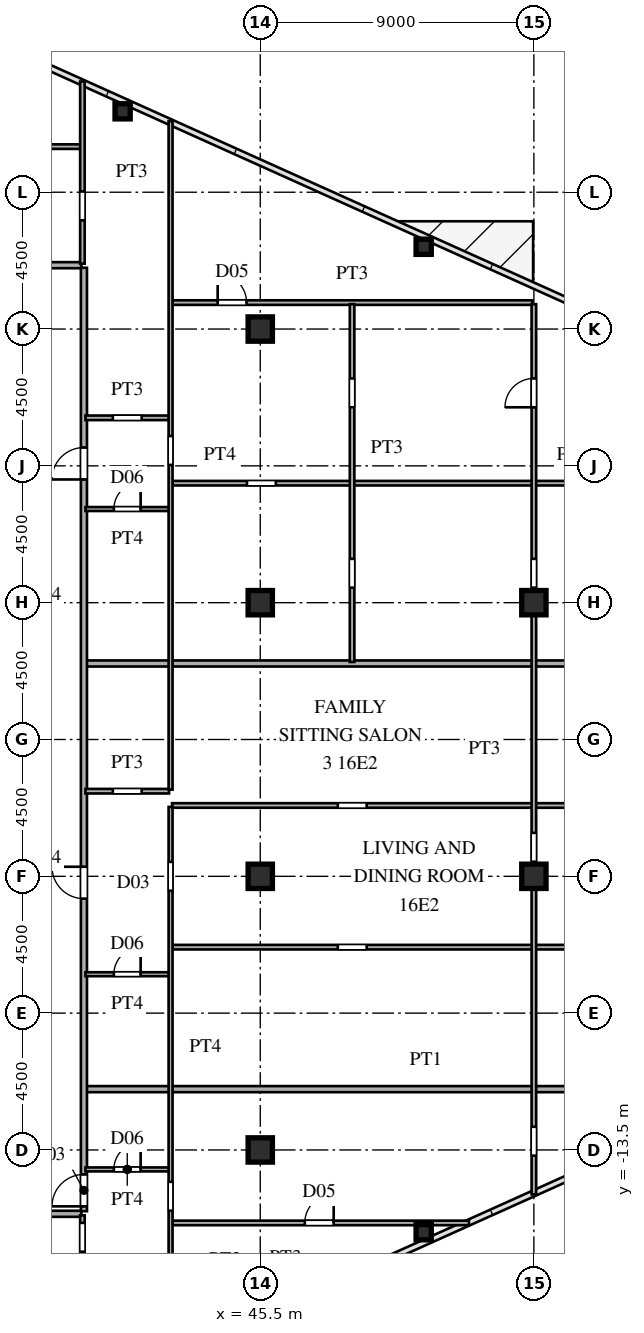
"""IFC4 building model, lengths in metres.
Left out: names, types, materials, properties, quantities, classifications, styles, units other than length and angle.
Written with IfcOpenShell. Run it as: python <this file> out.ifc"""

import sys

from ifc_helpers import new_model, si_unit, direction, frame, frame_2d, origin, origin_2d, place, context, subcontext, project, spatial, rectangle, hollow_rectangle, i_section, extrude, source, transform, mapped, element, fill, save


model = new_model("IFC4")
c1 = context("Model", 3, precision=1e-05, world=origin(), true_north=direction((0.0, 1.0)))
c2 = subcontext(c1, "Body", "Model", "MODEL_VIEW")
j1 = project(units=[si_unit("LENGTHUNIT", "METRE"), si_unit("PLANEANGLEUNIT", "RADIAN")], contexts=[c1])
p1 = place(None, origin())
s1 = spatial("IfcSite", under=j1, at=p1, CompositionType="ELEMENT")
p2 = place(p1, origin())
s2 = spatial("IfcBuilding", under=s1, at=p2, CompositionType="ELEMENT")
p3 = place(p2, frame((0.0, 0.0, 62.1)))
s3 = spatial("IfcBuildingStorey", under=s2, at=p3, CompositionType="ELEMENT", Elevation=62.1)
m1 = source(origin(), c2, "Body", "SweptSolid", [
    extrude(i_section(OverallWidth=0.8, OverallDepth=0.8, WebThickness=0.032, FlangeThickness=0.05, at=origin_2d()), origin(), (0.0, 0.0, 1.0), 3.6),
])
for number, where, z_axis, x_axis in (
    (1, (45.5, -13.5, 0.0), (0.0, 0.0, 1.0), (1.0, 0.0, 0.0)),
    (2, (45.5, -4.5, 0.0), (0.0, 0.0, 1.0), (1.0, 0.0, 0.0)),
    (3, (45.5, 4.5, 0.0), (0.0, 0.0, 1.0), (1.0, 0.0, 0.0)),
    (4, (45.5, 13.5, 0.0), (0.0, 0.0, 1.0), (1.0, 0.0, 0.0)),
    (5, (54.5, -4.5, 0.0), (0.0, 0.0, 1.0), (1.0, 0.0, 0.0)),
    (6, (54.5, 4.5, 0.0), (0.0, 0.0, 1.0), (1.0, 0.0, 0.0)),
):
    element("IfcColumn", number, at=place(p3, frame(where, z_axis=z_axis, x_axis=x_axis)), inside=s3, PredefinedType="COLUMN", context=c2, shape_type="MappedRepresentation", body=[
        mapped(m1, transform((0.0, 0.0, 0.0), scale=1.0)),
    ])
m2 = source(origin(), c2, "Body", "SweptSolid", [
    extrude(hollow_rectangle(XDim=0.5, YDim=0.5, WallThickness=0.02, at=origin_2d()), origin(), (0.0, 0.0, 1.0), 3.6),
])
for number, where, z_axis, x_axis in (
    (7, (50.875, -16.205, 0.0), (0.0, 0.0, 1.0), (1.0, 0.0, 0.0)),
    (8, (40.973, 20.661, 0.0), (0.0, 0.0, 1.0), (1.0, 0.0, 0.0)),
    (9, (50.875, 16.205, 0.0), (0.0, 0.0, 1.0), (1.0, 0.0, 0.0)),
):
    element("IfcColumn", number, at=place(p3, frame(where, z_axis=z_axis, x_axis=x_axis)), inside=s3, PredefinedType="COLUMN", context=c2, shape_type="MappedRepresentation", body=[
        mapped(m2, transform((0.0, 0.0, 0.0), scale=1.0)),
    ])
p4 = place(p3, frame((42.6, -15.9, 0.0), z_axis=(0.0, 0.0, 1.0), x_axis=(1.0, 0.0, 0.0)))
e10 = element("IfcWall", 10, at=p4, inside=s3, PredefinedType="PARTITIONING", context=c2, shape_type="SweptSolid", body=[
    extrude(rectangle(XDim=9.765, YDim=0.15, at=frame_2d((4.882, 0.0))), origin(), (0.0, 0.0, 1.0), 3.38),
])
p5 = place(p4, frame((4.365, 0.0, 0.0)))
e11 = element("IfcOpeningElement", 11, at=p5, cuts=e10, PredefinedType="OPENING", context=c2, shape_type="SweptSolid", body=[
    extrude(rectangle(XDim=0.95, YDim=2.15, at=frame_2d((0.475, 1.075))), frame((0.0, 0.085, 0.0), z_axis=(0.0, -1.0, 0.0), x_axis=(1.0, 0.0, 0.0)), (0.0, 0.0, 1.0), 0.17),
])
p6 = place(p3, frame((36.585, -15.6, 0.0), z_axis=(0.0, 0.0, 1.0), x_axis=(1.0, 0.0, 0.0)))
e12 = element("IfcWall", 12, at=p6, inside=s3, PredefinedType="PARTITIONING", context=c2, shape_type="SweptSolid", body=[
    extrude(rectangle(XDim=3.03, YDim=0.2, at=frame_2d((1.515, 0.0))), origin(), (0.0, 0.0, 1.0), 3.38),
])
p7 = place(p3, frame((39.75, -14.14, 0.0), z_axis=(0.0, 0.0, 1.0), x_axis=(1.0, 0.0, 0.0)))
e13 = element("IfcWall", 13, at=p7, inside=s3, PredefinedType="PARTITIONING", context=c2, shape_type="SweptSolid", body=[
    extrude(rectangle(XDim=2.75, YDim=0.13, at=frame_2d((1.375, 0.0))), origin(), (0.0, 0.0, 1.0), 3.38),
])
p8 = place(p7, frame((0.935, 0.0, 0.0)))
e14 = element("IfcOpeningElement", 14, at=p8, cuts=e13, PredefinedType="OPENING", context=c2, shape_type="SweptSolid", body=[
    extrude(rectangle(XDim=0.88, YDim=2.1, at=frame_2d((0.44, 1.05))), frame((0.0, 0.075, 0.0), z_axis=(0.0, -1.0, 0.0), x_axis=(1.0, 0.0, 0.0)), (0.0, 0.0, 1.0), 0.15),
])
p9 = place(p3, frame((39.78, -11.5, 0.0), z_axis=(0.0, 0.0, 1.0), x_axis=(1.0, 0.0, 0.0)))
e15 = element("IfcWall", 15, at=p9, inside=s3, PredefinedType="PARTITIONING", context=c2, shape_type="SweptSolid", body=[
    extrude(rectangle(XDim=22.343, YDim=0.2, at=frame_2d((11.171, 0.0))), origin(), (0.0, 0.0, 1.0), 3.38),
])
p10 = place(p3, frame((39.75, -7.72, 0.0), z_axis=(0.0, 0.0, 1.0), x_axis=(1.0, 0.0, 0.0)))
e16 = element("IfcWall", 16, at=p10, inside=s3, PredefinedType="PARTITIONING", context=c2, shape_type="SweptSolid", body=[
    extrude(rectangle(XDim=2.75, YDim=0.13, at=frame_2d((1.375, 0.0))), origin(), (0.0, 0.0, 1.0), 3.38),
])
p11 = place(p10, frame((0.935, 0.0, 0.0)))
e17 = element("IfcOpeningElement", 17, at=p11, cuts=e16, PredefinedType="OPENING", context=c2, shape_type="SweptSolid", body=[
    extrude(rectangle(XDim=0.88, YDim=2.1, at=frame_2d((0.44, 1.05))), frame((0.0, 0.075, 0.0), z_axis=(0.0, -1.0, 0.0), x_axis=(1.0, 0.0, 0.0)), (0.0, 0.0, 1.0), 0.15),
])
p12 = place(p3, frame((42.6, -6.83, 0.0), z_axis=(0.0, 0.0, 1.0), x_axis=(1.0, 0.0, 0.0)))
e18 = element("IfcWall", 18, at=p12, inside=s3, PredefinedType="PARTITIONING", context=c2, shape_type="SweptSolid", body=[
    extrude(rectangle(XDim=28.275, YDim=0.15, at=frame_2d((14.137, 0.0))), origin(), (0.0, 0.0, 1.0), 3.38),
])
p13 = place(p12, frame((5.45, 0.0, 0.0)))
e19 = element("IfcOpeningElement", 19, at=p13, cuts=e18, PredefinedType="OPENING", context=c2, shape_type="SweptSolid", body=[
    extrude(rectangle(XDim=0.95, YDim=2.15, at=frame_2d((0.475, 1.075))), frame((0.0, 0.085, 0.0), z_axis=(0.0, -1.0, 0.0), x_axis=(1.0, 0.0, 0.0)), (0.0, 0.0, 1.0), 0.17),
])
p14 = place(p12, frame((14.275, 0.0, 0.0)))
e20 = element("IfcOpeningElement", 20, at=p14, cuts=e18, PredefinedType="OPENING", context=c2, shape_type="SweptSolid", body=[
    extrude(rectangle(XDim=0.95, YDim=2.15, at=frame_2d((0.475, 1.075))), frame((0.0, 0.085, 0.0), z_axis=(0.0, -1.0, 0.0), x_axis=(1.0, 0.0, 0.0)), (0.0, 0.0, 1.0), 0.17),
])
p15 = place(p3, frame((42.6, -2.17, 0.0), z_axis=(0.0, 0.0, 1.0), x_axis=(1.0, 0.0, 0.0)))
e21 = element("IfcWall", 21, at=p15, inside=s3, PredefinedType="PARTITIONING", context=c2, shape_type="SweptSolid", body=[
    extrude(rectangle(XDim=28.435, YDim=0.15, at=frame_2d((14.217, 0.0))), origin(), (0.0, 0.0, 1.0), 3.38),
])
p16 = place(p15, frame((5.45, 0.0, 0.0)))
e22 = element("IfcOpeningElement", 22, at=p16, cuts=e21, PredefinedType="OPENING", context=c2, shape_type="SweptSolid", body=[
    extrude(rectangle(XDim=0.95, YDim=2.15, at=frame_2d((0.475, 1.075))), frame((0.0, 0.085, 0.0), z_axis=(0.0, -1.0, 0.0), x_axis=(1.0, 0.0, 0.0)), (0.0, 0.0, 1.0), 0.17),
])
p17 = place(p15, frame((14.275, 0.0, 0.0)))
e23 = element("IfcOpeningElement", 23, at=p17, cuts=e21, PredefinedType="OPENING", context=c2, shape_type="SweptSolid", body=[
    extrude(rectangle(XDim=0.95, YDim=2.15, at=frame_2d((0.475, 1.075))), frame((0.0, 0.085, 0.0), z_axis=(0.0, -1.0, 0.0), x_axis=(1.0, 0.0, 0.0)), (0.0, 0.0, 1.0), 0.17),
])
p18 = place(p3, frame((39.75, -1.7, 0.0), z_axis=(0.0, 0.0, 1.0), x_axis=(1.0, 0.0, 0.0)))
e24 = element("IfcWall", 24, at=p18, inside=s3, PredefinedType="PARTITIONING", context=c2, shape_type="SweptSolid", body=[
    extrude(rectangle(XDim=2.75, YDim=0.15, at=frame_2d((1.375, 0.0))), origin(), (0.0, 0.0, 1.0), 3.38),
])
p19 = place(p18, frame((0.9, 0.0, 0.0)))
e25 = element("IfcOpeningElement", 25, at=p19, cuts=e24, PredefinedType="OPENING", context=c2, shape_type="SweptSolid", body=[
    extrude(rectangle(XDim=0.95, YDim=2.15, at=frame_2d((0.475, 1.075))), frame((0.0, 0.085, 0.0), z_axis=(0.0, -1.0, 0.0), x_axis=(1.0, 0.0, 0.0)), (0.0, 0.0, 1.0), 0.17),
])
p20 = place(p3, frame((39.78, 2.5, 0.0), z_axis=(0.0, 0.0, 1.0), x_axis=(1.0, 0.0, 0.0)))
e26 = element("IfcWall", 26, at=p20, inside=s3, PredefinedType="PARTITIONING", context=c2, shape_type="SweptSolid", body=[
    extrude(rectangle(XDim=31.225, YDim=0.2, at=frame_2d((15.612, 0.0))), origin(), (0.0, 0.0, 1.0), 3.38),
])
p21 = place(p3, frame((39.75, 7.58, 0.0), z_axis=(0.0, 0.0, 1.0), x_axis=(1.0, 0.0, 0.0)))
e27 = element("IfcWall", 27, at=p21, inside=s3, PredefinedType="PARTITIONING", context=c2, shape_type="SweptSolid", body=[
    extrude(rectangle(XDim=2.75, YDim=0.13, at=frame_2d((1.375, 0.0))), origin(), (0.0, 0.0, 1.0), 3.38),
])
p22 = place(p21, frame((0.935, 0.0, 0.0)))
e28 = element("IfcOpeningElement", 28, at=p22, cuts=e27, PredefinedType="OPENING", context=c2, shape_type="SweptSolid", body=[
    extrude(rectangle(XDim=0.88, YDim=2.1, at=frame_2d((0.44, 1.05))), frame((0.0, 0.075, 0.0), z_axis=(0.0, -1.0, 0.0), x_axis=(1.0, 0.0, 0.0)), (0.0, 0.0, 1.0), 0.15),
])
p23 = place(p3, frame((42.6, 8.43, 0.0), z_axis=(0.0, 0.0, 1.0), x_axis=(1.0, 0.0, 0.0)))
e29 = element("IfcWall", 29, at=p23, inside=s3, PredefinedType="PARTITIONING", context=c2, shape_type="SweptSolid", body=[
    extrude(rectangle(XDim=26.359, YDim=0.15, at=frame_2d((13.179, 0.0))), origin(), (0.0, 0.0, 1.0), 3.38),
])
p24 = place(p23, frame((2.462, 0.0, 0.0)))
e30 = element("IfcOpeningElement", 30, at=p24, cuts=e29, PredefinedType="OPENING", context=c2, shape_type="SweptSolid", body=[
    extrude(rectangle(XDim=0.95, YDim=2.15, at=frame_2d((0.475, 1.075))), frame((0.0, 0.085, 0.0), z_axis=(0.0, -1.0, 0.0), x_axis=(1.0, 0.0, 0.0)), (0.0, 0.0, 1.0), 0.17),
])
p25 = place(p3, frame((39.75, 10.58, 0.0), z_axis=(0.0, 0.0, 1.0), x_axis=(1.0, 0.0, 0.0)))
e31 = element("IfcWall", 31, at=p25, inside=s3, PredefinedType="PARTITIONING", context=c2, shape_type="SweptSolid", body=[
    extrude(rectangle(XDim=2.75, YDim=0.15, at=frame_2d((1.375, 0.0))), origin(), (0.0, 0.0, 1.0), 3.38),
])
p26 = place(p25, frame((0.9, 0.0, 0.0)))
e32 = element("IfcOpeningElement", 32, at=p26, cuts=e31, PredefinedType="OPENING", context=c2, shape_type="SweptSolid", body=[
    extrude(rectangle(XDim=0.95, YDim=2.15, at=frame_2d((0.475, 1.075))), frame((0.0, 0.085, 0.0), z_axis=(0.0, -1.0, 0.0), x_axis=(1.0, 0.0, 0.0)), (0.0, 0.0, 1.0), 0.17),
])
p27 = place(p3, frame((42.6, 14.37, 0.0), z_axis=(0.0, 0.0, 1.0), x_axis=(1.0, 0.0, 0.0)))
e33 = element("IfcWall", 33, at=p27, inside=s3, PredefinedType="PARTITIONING", context=c2, shape_type="SweptSolid", body=[
    extrude(rectangle(XDim=11.85, YDim=0.15, at=frame_2d((5.925, 0.0))), origin(), (0.0, 0.0, 1.0), 3.38),
])
p28 = place(p27, frame((1.5, 0.0, 0.0)))
e34 = element("IfcOpeningElement", 34, at=p28, cuts=e33, PredefinedType="OPENING", context=c2, shape_type="SweptSolid", body=[
    extrude(rectangle(XDim=0.95, YDim=2.15, at=frame_2d((0.475, 1.075))), frame((0.0, 0.085, 0.0), z_axis=(0.0, -1.0, 0.0), x_axis=(1.0, 0.0, 0.0)), (0.0, 0.0, 1.0), 0.17),
])
p29 = place(p3, frame((36.585, 15.6, 0.0), z_axis=(0.0, 0.0, 1.0), x_axis=(1.0, 0.0, 0.0)))
e35 = element("IfcWall", 35, at=p29, inside=s3, PredefinedType="PARTITIONING", context=c2, shape_type="SweptSolid", body=[
    extrude(rectangle(XDim=3.03, YDim=0.2, at=frame_2d((1.515, 0.0))), origin(), (0.0, 0.0, 1.0), 3.38),
])
p30 = place(p3, frame((27.465, 19.5, 0.0), z_axis=(0.0, 0.0, 1.0), x_axis=(1.0, 0.0, 0.0)))
e36 = element("IfcWall", 36, at=p30, inside=s3, PredefinedType="PARTITIONING", context=c2, shape_type="SweptSolid", body=[
    extrude(rectangle(XDim=12.135, YDim=0.15, at=frame_2d((6.067, 0.0))), origin(), (0.0, 0.0, 1.0), 3.38),
])
p31 = place(p30, frame((5.635, 0.0, 0.0)))
e37 = element("IfcOpeningElement", 37, at=p31, cuts=e36, PredefinedType="OPENING", context=c2, shape_type="SweptSolid", body=[
    extrude(rectangle(XDim=0.95, YDim=2.15, at=frame_2d((0.475, 1.075))), frame((0.0, 0.085, 0.0), z_axis=(0.0, -1.0, 0.0), x_axis=(1.0, 0.0, 0.0)), (0.0, 0.0, 1.0), 0.17),
])
p32 = place(p3, frame((39.65, -21.642, 0.0), z_axis=(0.0, 0.0, 1.0), x_axis=(0.0, 1.0, 0.0)))
e38 = element("IfcWall", 38, at=p32, inside=s3, PredefinedType="PARTITIONING", context=c2, shape_type="SweptSolid", body=[
    extrude(rectangle(XDim=5.992, YDim=0.15, at=frame_2d((2.996, 0.0))), origin(), (0.0, 0.0, 1.0), 3.38),
])
p33 = place(p32, frame((4.794, 0.0, 0.0)))
e39 = element("IfcOpeningElement", 39, at=p33, cuts=e38, PredefinedType="OPENING", context=c2, shape_type="SweptSolid", body=[
    extrude(rectangle(XDim=0.95, YDim=2.15, at=frame_2d((0.475, 1.075))), frame((0.0, 0.085, 0.0), z_axis=(0.0, -1.0, 0.0), x_axis=(1.0, 0.0, 0.0)), (0.0, 0.0, 1.0), 0.17),
])
p34 = place(p3, frame((39.65, 15.65, 0.0), z_axis=(0.0, 0.0, 1.0), x_axis=(0.0, 1.0, 0.0)))
e40 = element("IfcWall", 40, at=p34, inside=s3, PredefinedType="PARTITIONING", context=c2, shape_type="SweptSolid", body=[
    extrude(rectangle(XDim=5.992, YDim=0.15, at=frame_2d((2.996, 0.0))), origin(), (0.0, 0.0, 1.0), 3.38),
])
p35 = place(p34, frame((1.425, 0.0, 0.0)))
e41 = element("IfcOpeningElement", 41, at=p35, cuts=e40, PredefinedType="OPENING", context=c2, shape_type="SweptSolid", body=[
    extrude(rectangle(XDim=0.95, YDim=2.15, at=frame_2d((0.475, 1.075))), frame((0.0, 0.085, 0.0), z_axis=(0.0, -1.0, 0.0), x_axis=(1.0, 0.0, 0.0)), (0.0, 0.0, 1.0), 0.17),
])
p36 = place(p3, frame((39.7, -15.515, 0.0), z_axis=(0.0, 0.0, 1.0), x_axis=(0.0, 1.0, 0.0)))
e42 = element("IfcWall", 42, at=p36, inside=s3, PredefinedType="PARTITIONING", context=c2, shape_type="SweptSolid", body=[
    extrude(rectangle(XDim=31.03, YDim=0.2, at=frame_2d((15.515, 0.0))), origin(), (0.0, 0.0, 1.0), 3.38),
])
p37 = place(p36, frame((0.16, 0.0, 0.0)))
e43 = element("IfcOpeningElement", 43, at=p37, cuts=e42, PredefinedType="OPENING", context=c2, shape_type="SweptSolid", body=[
    extrude(rectangle(XDim=1.05, YDim=2.25, at=frame_2d((0.525, 1.125))), frame((0.0, 0.11, 0.0), z_axis=(0.0, -1.0, 0.0), x_axis=(1.0, 0.0, 0.0)), (0.0, 0.0, 1.0), 0.22),
])
p38 = place(p36, frame((10.28, 0.0, 0.0)))
e44 = element("IfcOpeningElement", 44, at=p38, cuts=e42, PredefinedType="OPENING", context=c2, shape_type="SweptSolid", body=[
    extrude(rectangle(XDim=1.05, YDim=2.25, at=frame_2d((0.525, 1.125))), frame((0.0, 0.11, 0.0), z_axis=(0.0, -1.0, 0.0), x_axis=(1.0, 0.0, 0.0)), (0.0, 0.0, 1.0), 0.22),
])
p39 = place(p36, frame((24.067, 0.0, 0.0)))
e45 = element("IfcOpeningElement", 45, at=p39, cuts=e42, PredefinedType="OPENING", context=c2, shape_type="SweptSolid", body=[
    extrude(rectangle(XDim=1.05, YDim=2.25, at=frame_2d((0.525, 1.125))), frame((0.0, 0.11, 0.0), z_axis=(0.0, -1.0, 0.0), x_axis=(1.0, 0.0, 0.0)), (0.0, 0.0, 1.0), 0.22),
])
p40 = place(p3, frame((42.55, -20.337, 0.0), z_axis=(0.0, 0.0, 1.0), x_axis=(0.0, 1.0, 0.0)))
e46 = element("IfcWall", 46, at=p40, inside=s3, PredefinedType="PARTITIONING", context=c2, shape_type="SweptSolid", body=[
    extrude(rectangle(XDim=18.12, YDim=0.13, at=frame_2d((9.06, 0.0))), origin(), (0.0, 0.0, 1.0), 3.38),
])
p41 = place(p40, frame((4.839, 0.0, 0.0)))
e47 = element("IfcOpeningElement", 47, at=p41, cuts=e46, PredefinedType="OPENING", context=c2, shape_type="SweptSolid", body=[
    extrude(rectangle(XDim=0.95, YDim=2.15, at=frame_2d((0.475, 1.075))), frame((0.0, 0.075, 0.0), z_axis=(0.0, -1.0, 0.0), x_axis=(1.0, 0.0, 0.0)), (0.0, 0.0, 1.0), 0.15),
])
p42 = place(p40, frame((15.362, 0.0, 0.0)))
e48 = element("IfcOpeningElement", 48, at=p42, cuts=e46, PredefinedType="OPENING", context=c2, shape_type="SweptSolid", body=[
    extrude(rectangle(XDim=0.95, YDim=2.15, at=frame_2d((0.475, 1.075))), frame((0.0, 0.075, 0.0), z_axis=(0.0, -1.0, 0.0), x_axis=(1.0, 0.0, 0.0)), (0.0, 0.0, 1.0), 0.15),
])
p43 = place(p3, frame((42.55, -1.648, 0.0), z_axis=(0.0, 0.0, 1.0), x_axis=(0.0, 1.0, 0.0)))
e49 = element("IfcWall", 49, at=p43, inside=s3, PredefinedType="PARTITIONING", context=c2, shape_type="SweptSolid", body=[
    extrude(rectangle(XDim=21.985, YDim=0.13, at=frame_2d((10.992, 0.0))), origin(), (0.0, 0.0, 1.0), 3.38),
])
p44 = place(p43, frame((10.679, 0.0, 0.0)))
e50 = element("IfcOpeningElement", 50, at=p44, cuts=e49, PredefinedType="OPENING", context=c2, shape_type="SweptSolid", body=[
    extrude(rectangle(XDim=0.95, YDim=2.15, at=frame_2d((0.475, 1.075))), frame((0.0, 0.075, 0.0), z_axis=(0.0, -1.0, 0.0), x_axis=(1.0, 0.0, 0.0)), (0.0, 0.0, 1.0), 0.15),
])
p45 = place(p3, frame((48.52, 2.55, 0.0), z_axis=(0.0, 0.0, 1.0), x_axis=(0.0, 1.0, 0.0)))
e51 = element("IfcWall", 51, at=p45, inside=s3, PredefinedType="PARTITIONING", context=c2, shape_type="SweptSolid", body=[
    extrude(rectangle(XDim=11.768, YDim=0.15, at=frame_2d((5.884, 0.0))), origin(), (0.0, 0.0, 1.0), 3.38),
])
p46 = place(p45, frame((8.376, 0.0, 0.0)))
e52 = element("IfcOpeningElement", 52, at=p46, cuts=e51, PredefinedType="OPENING", context=c2, shape_type="SweptSolid", body=[
    extrude(rectangle(XDim=0.95, YDim=2.15, at=frame_2d((0.475, 1.075))), frame((0.0, 0.085, 0.0), z_axis=(0.0, -1.0, 0.0), x_axis=(1.0, 0.0, 0.0)), (0.0, 0.0, 1.0), 0.17),
])
p47 = place(p45, frame((2.442, 0.0, 0.0)))
e53 = element("IfcOpeningElement", 53, at=p47, cuts=e51, PredefinedType="OPENING", context=c2, shape_type="SweptSolid", body=[
    extrude(rectangle(XDim=0.95, YDim=2.15, at=frame_2d((0.475, 1.075))), frame((0.0, 0.085, 0.0), z_axis=(0.0, -1.0, 0.0), x_axis=(1.0, 0.0, 0.0)), (0.0, 0.0, 1.0), 0.17),
])
p48 = place(p3, frame((54.5, -14.96, 0.0), z_axis=(0.0, 0.0, 1.0), x_axis=(0.0, 1.0, 0.0)))
e54 = element("IfcWall", 54, at=p48, inside=s3, PredefinedType="PARTITIONING", context=c2, shape_type="SweptSolid", body=[
    extrude(rectangle(XDim=29.278, YDim=0.15, at=frame_2d((14.639, 0.0))), origin(), (0.0, 0.0, 1.0), 2.68),
])
p49 = place(p48, frame((1.272, 0.0, 0.0)))
e55 = element("IfcOpeningElement", 55, at=p49, cuts=e54, PredefinedType="OPENING", context=c2, shape_type="SweptSolid", body=[
    extrude(rectangle(XDim=0.95, YDim=2.15, at=frame_2d((0.475, 1.075))), frame((0.0, 0.085, 0.0), z_axis=(0.0, -1.0, 0.0), x_axis=(1.0, 0.0, 0.0)), (0.0, 0.0, 1.0), 0.17),
])
p50 = place(p48, frame((10.94, 0.0, 0.0)))
e56 = element("IfcOpeningElement", 56, at=p50, cuts=e54, PredefinedType="OPENING", context=c2, shape_type="SweptSolid", body=[
    extrude(rectangle(XDim=0.95, YDim=2.15, at=frame_2d((0.475, 1.075))), frame((0.0, 0.085, 0.0), z_axis=(0.0, -1.0, 0.0), x_axis=(1.0, 0.0, 0.0)), (0.0, 0.0, 1.0), 0.17),
])
p51 = place(p48, frame((25.886, 0.0, 0.0)))
e57 = element("IfcOpeningElement", 57, at=p51, cuts=e54, PredefinedType="OPENING", context=c2, shape_type="SweptSolid", body=[
    extrude(rectangle(XDim=0.95, YDim=2.15, at=frame_2d((0.475, 1.075))), frame((0.0, 0.085, 0.0), z_axis=(0.0, -1.0, 0.0), x_axis=(1.0, 0.0, 0.0)), (0.0, 0.0, 1.0), 0.17),
])
p52 = place(p48, frame((19.952, 0.0, 0.0)))
e58 = element("IfcOpeningElement", 58, at=p52, cuts=e54, PredefinedType="OPENING", context=c2, shape_type="SweptSolid", body=[
    extrude(rectangle(XDim=0.95, YDim=2.15, at=frame_2d((0.475, 1.075))), frame((0.0, 0.085, 0.0), z_axis=(0.0, -1.0, 0.0), x_axis=(1.0, 0.0, 0.0)), (0.0, 0.0, 1.0), 0.17),
])
m3 = source(origin(), c2, "Body", "SweptSolid", [
    extrude(rectangle(XDim=0.95, YDim=2.15, at=frame_2d((0.475, 1.075))), frame((0.0, 0.025, 0.0), z_axis=(0.0, -1.0, 0.0), x_axis=(1.0, 0.0, 0.0)), (0.0, 0.0, 1.0), 0.05),
])
p53 = place(p5, origin())
e59 = element("IfcDoor", 59, at=p53, inside=s3, OperationType="SINGLE_SWING_RIGHT", PredefinedType="DOOR", context=c2, shape_type="MappedRepresentation", body=[
    mapped(m3, transform((0.0, 0.0, 0.0), scale=1.0)),
])
fill(e11, e59)
m4 = source(origin(), c2, "Body", "SweptSolid", [
    extrude(rectangle(XDim=0.88, YDim=2.1, at=frame_2d((0.44, 1.05))), frame((0.0, 0.025, 0.0), z_axis=(0.0, -1.0, 0.0), x_axis=(1.0, 0.0, 0.0)), (0.0, 0.0, 1.0), 0.05),
])
p54 = place(p8, origin())
e60 = element("IfcDoor", 60, at=p54, inside=s3, OperationType="SINGLE_SWING_RIGHT", PredefinedType="DOOR", context=c2, shape_type="MappedRepresentation", body=[
    mapped(m4, transform((0.0, 0.0, 0.0), scale=1.0)),
])
fill(e14, e60)
p55 = place(p11, origin())
e61 = element("IfcDoor", 61, at=p55, inside=s3, OperationType="SINGLE_SWING_RIGHT", PredefinedType="DOOR", context=c2, shape_type="MappedRepresentation", body=[
    mapped(m4, transform((0.0, 0.0, 0.0), scale=1.0)),
])
fill(e17, e61)
p56 = place(p22, origin())
e62 = element("IfcDoor", 62, at=p56, inside=s3, OperationType="SINGLE_SWING_RIGHT", PredefinedType="DOOR", context=c2, shape_type="MappedRepresentation", body=[
    mapped(m4, transform((0.0, 0.0, 0.0), scale=1.0)),
])
fill(e28, e62)
p57 = place(p28, origin())
e63 = element("IfcDoor", 63, at=p57, inside=s3, OperationType="SINGLE_SWING_LEFT", PredefinedType="DOOR", context=c2, shape_type="MappedRepresentation", body=[
    mapped(m3, transform((0.0, 0.0, 0.0), scale=1.0)),
])
fill(e34, e63)
m5 = source(origin(), c2, "Body", "SweptSolid", [
    extrude(rectangle(XDim=1.05, YDim=2.25, at=frame_2d((0.525, 1.125))), frame((0.0, 0.025, 0.0), z_axis=(0.0, -1.0, 0.0), x_axis=(1.0, 0.0, 0.0)), (0.0, 0.0, 1.0), 0.05),
])
p58 = place(p37, origin())
e64 = element("IfcDoor", 64, at=p58, inside=s3, OperationType="SINGLE_SWING_LEFT", PredefinedType="DOOR", context=c2, shape_type="MappedRepresentation", body=[
    mapped(m5, transform((0.0, 0.0, 0.0), scale=1.0)),
])
fill(e43, e64)
p59 = place(p38, origin())
e65 = element("IfcDoor", 65, at=p59, inside=s3, OperationType="SINGLE_SWING_RIGHT", PredefinedType="DOOR", context=c2, shape_type="MappedRepresentation", body=[
    mapped(m5, transform((0.0, 0.0, 0.0), scale=1.0)),
])
fill(e44, e65)
p60 = place(p39, origin())
e66 = element("IfcDoor", 66, at=p60, inside=s3, OperationType="SINGLE_SWING_LEFT", PredefinedType="DOOR", context=c2, shape_type="MappedRepresentation", body=[
    mapped(m5, transform((0.0, 0.0, 0.0), scale=1.0)),
])
fill(e45, e66)
p61 = place(p51, origin())
e67 = element("IfcDoor", 67, at=p61, inside=s3, OperationType="SINGLE_SWING_LEFT", PredefinedType="DOOR", context=c2, shape_type="MappedRepresentation", body=[
    mapped(m3, transform((0.0, 0.0, 0.0), scale=1.0)),
])
fill(e57, e67)
save(model, sys.argv[1])
